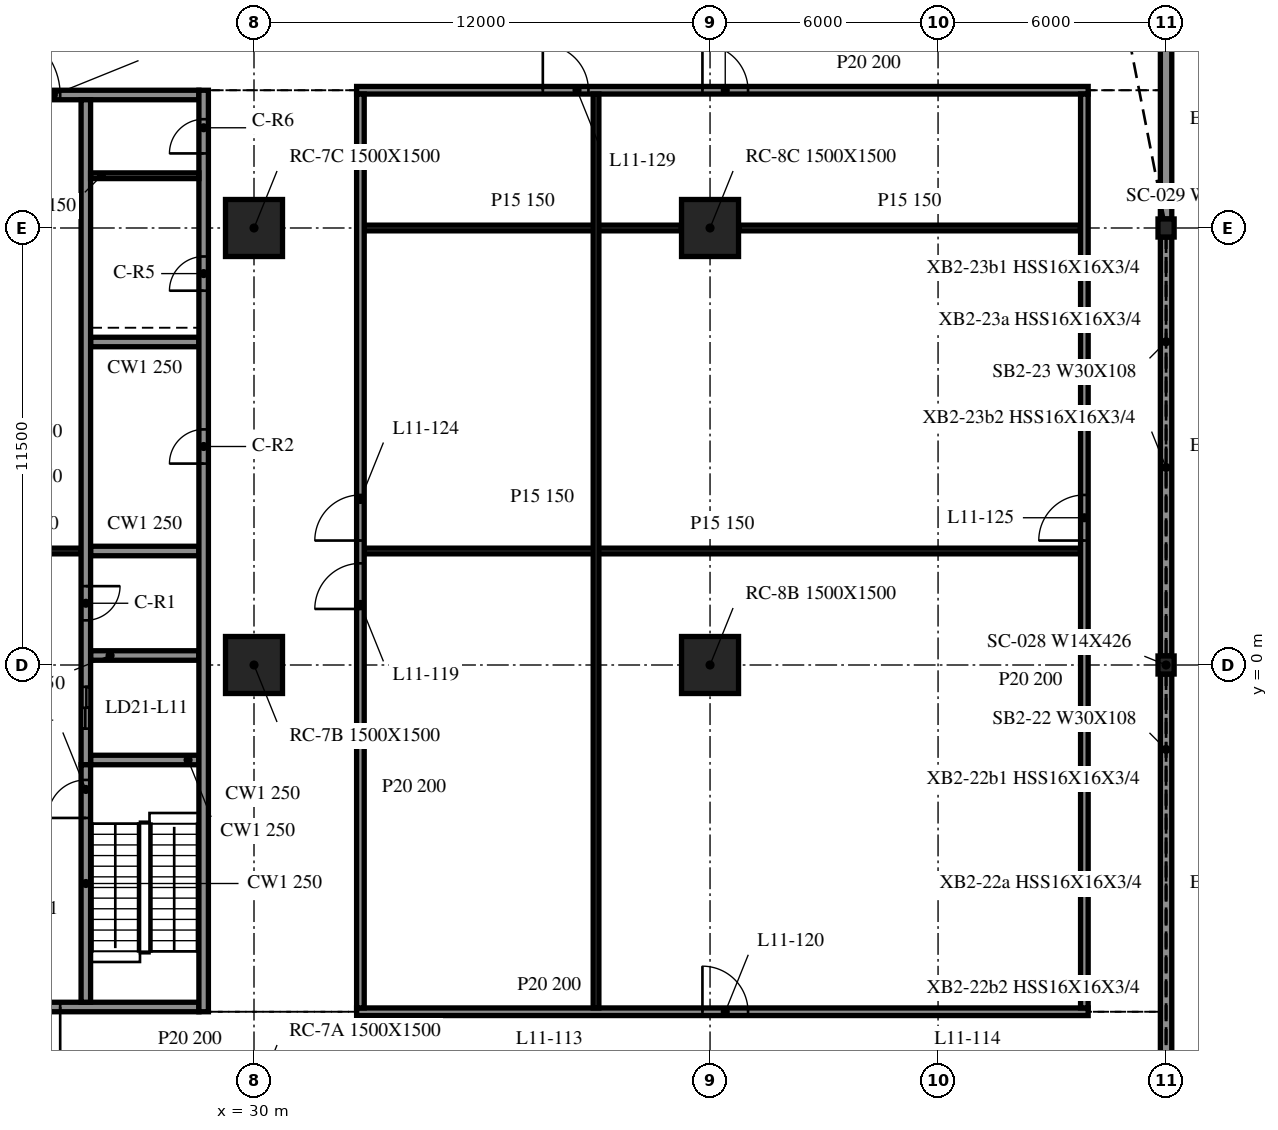
"""IFC4 building model, lengths in metres.
Left out: names, types, materials, properties, quantities, classifications, styles, units other than length and angle.
Written with IfcOpenShell. Run it as: python <this file> out.ifc"""

import sys

from ifc_helpers import new_model, si_unit, direction, frame, frame_2d, origin, origin_2d, place, context, subcontext, project, spatial, rectangle, i_section, extrude, element, fill, save


model = new_model("IFC4")
c1 = context("Model", 3, precision=1e-05, world=origin(), true_north=direction((0.0, 1.0)))
c2 = subcontext(c1, "Body", "Model", "MODEL_VIEW")
j1 = project(units=[si_unit("LENGTHUNIT", "METRE"), si_unit("PLANEANGLEUNIT", "RADIAN")], contexts=[c1])
p1 = place(None, origin())
s1 = spatial("IfcSite", under=j1, at=p1, CompositionType="ELEMENT")
p2 = place(p1, origin())
s2 = spatial("IfcBuilding", under=s1, at=p2, CompositionType="ELEMENT")
p3 = place(p2, frame((0.0, 0.0, 50.3)))
s3 = spatial("IfcBuildingStorey", under=s2, at=p3, CompositionType="ELEMENT", Elevation=50.3)
for number, where, z_axis, x_axis in (
    (1, (30.0, 0.0, -0.34), (0.0, 0.0, 1.0), (1.0, 0.0, 0.0)),
    (2, (30.0, 11.5, -0.34), (0.0, 0.0, 1.0), (1.0, 0.0, 0.0)),
    (3, (42.0, 0.0, -0.34), (0.0, 0.0, 1.0), (1.0, 0.0, 0.0)),
    (4, (42.0, 11.5, -0.34), (0.0, 0.0, 1.0), (1.0, 0.0, 0.0)),
):
    element("IfcColumn", number, at=place(p3, frame(where, z_axis=z_axis, x_axis=x_axis)), inside=s3, PredefinedType="COLUMN", context=c2, shape_type="SweptSolid", body=[
        extrude(rectangle(XDim=1.5, YDim=1.5, at=origin_2d()), origin(), (0.0, 0.0, 1.0), 4.3),
    ])
for number, where, z_axis, x_axis in (
    (5, (54.0, 0.0, -0.34), (0.0, 0.0, 1.0), (1.0, 0.0, 0.0)),
    (6, (54.0, 11.5, -0.34), (0.0, 0.0, 1.0), (1.0, 0.0, 0.0)),
):
    element("IfcColumn", number, at=place(p3, frame(where, z_axis=z_axis, x_axis=x_axis)), inside=s3, PredefinedType="COLUMN", context=c2, shape_type="SweptSolid", body=[
        extrude(i_section(OverallWidth=0.424, OverallDepth=0.475, WebThickness=0.048, FlangeThickness=0.077, at=origin_2d()), origin(), (0.0, 0.0, 1.0), 4.3),
    ])
for number, where, z_axis, x_axis in (
    (7, (54.0, -11.262, 0.0), (0.0, 0.0, 1.0), (0.0, 1.0, 0.0)),
    (8, (54.0, 0.238, 0.0), (0.0, 0.0, 1.0), (0.0, 1.0, 0.0)),
):
    element("IfcWall", number, at=place(p3, frame(where, z_axis=z_axis, x_axis=x_axis)), inside=s3, PredefinedType="NOTDEFINED", context=c2, shape_type="SweptSolid", body=[
        extrude(rectangle(XDim=11.024, YDim=0.3, at=frame_2d((5.512, 0.0))), origin(), (0.0, 0.0, 1.0), 3.203),
    ])
p4 = place(p3, frame((54.0, 11.738, 0.0), z_axis=(0.0, 0.0, 1.0), x_axis=(0.0, 1.0, 0.0)))
e9 = element("IfcWall", 9, at=p4, inside=s3, PredefinedType="NOTDEFINED", context=c2, shape_type="SweptSolid", body=[
    extrude(rectangle(XDim=5.262, YDim=0.3, at=frame_2d((2.631, 0.0))), origin(), (0.0, 0.0, 1.0), 3.203),
])
p5 = place(p3, frame((28.675, -9.125, 0.0), z_axis=(0.0, 0.0, 1.0), x_axis=(0.0, 1.0, 0.0)))
e10 = element("IfcWall", 10, at=p5, inside=s3, PredefinedType="SOLIDWALL", context=c2, shape_type="SweptSolid", body=[
    extrude(rectangle(XDim=24.25, YDim=0.25, at=frame_2d((12.125, 0.0))), origin(), (0.0, 0.0, 1.0), 3.96),
])
p6 = place(p5, frame((14.425, 0.0, 0.0)))
e11 = element("IfcOpeningElement", 11, at=p6, cuts=e10, PredefinedType="OPENING", context=c2, shape_type="SweptSolid", body=[
    extrude(rectangle(XDim=0.9, YDim=2.1, at=frame_2d((0.45, 1.05))), frame((0.0, 0.135, 0.0), z_axis=(0.0, -1.0, 0.0), x_axis=(1.0, 0.0, 0.0)), (0.0, 0.0, 1.0), 0.27),
])
p7 = place(p5, frame((18.975, 0.0, 0.0)))
e12 = element("IfcOpeningElement", 12, at=p7, cuts=e10, PredefinedType="OPENING", context=c2, shape_type="SweptSolid", body=[
    extrude(rectangle(XDim=0.9, YDim=2.1, at=frame_2d((0.45, 1.05))), frame((0.0, 0.135, 0.0), z_axis=(0.0, -1.0, 0.0), x_axis=(1.0, 0.0, 0.0)), (0.0, 0.0, 1.0), 0.27),
])
p8 = place(p5, frame((22.587, 0.0, 0.0)))
e13 = element("IfcOpeningElement", 13, at=p8, cuts=e10, PredefinedType="OPENING", context=c2, shape_type="SweptSolid", body=[
    extrude(rectangle(XDim=0.9, YDim=2.1, at=frame_2d((0.45, 1.05))), frame((0.0, 0.135, 0.0), z_axis=(0.0, -1.0, 0.0), x_axis=(1.0, 0.0, 0.0)), (0.0, 0.0, 1.0), 0.27),
])
p9 = place(p3, frame((28.55, -9.0, 0.0), z_axis=(0.0, 0.0, 1.0), x_axis=(-1.0, 0.0, 0.0)))
e14 = element("IfcWall", 14, at=p9, inside=s3, PredefinedType="SOLIDWALL", context=c2, shape_type="SweptSolid", body=[
    extrude(rectangle(XDim=9.1, YDim=0.25, at=frame_2d((4.55, 0.0))), origin(), (0.0, 0.0, 1.0), 3.96),
])
p10 = place(p9, frame((3.65, 0.0, 0.0)))
e15 = element("IfcOpeningElement", 15, at=p10, cuts=e14, PredefinedType="OPENING", context=c2, shape_type="SweptSolid", body=[
    extrude(rectangle(XDim=1.8, YDim=2.1, at=frame_2d((0.9, 1.05))), frame((0.0, 0.135, 0.0), z_axis=(0.0, -1.0, 0.0), x_axis=(1.0, 0.0, 0.0)), (0.0, 0.0, 1.0), 0.27),
])
p11 = place(p3, frame((19.45, 15.0, 0.0), z_axis=(0.0, 0.0, 1.0), x_axis=(1.0, 0.0, 0.0)))
e16 = element("IfcWall", 16, at=p11, inside=s3, PredefinedType="SOLIDWALL", context=c2, shape_type="SweptSolid", body=[
    extrude(rectangle(XDim=9.1, YDim=0.25, at=frame_2d((4.55, 0.0))), origin(), (0.0, 0.0, 1.0), 3.96),
])
p12 = place(p11, frame((3.65, 0.0, 0.0)))
e17 = element("IfcOpeningElement", 17, at=p12, cuts=e16, PredefinedType="OPENING", context=c2, shape_type="SweptSolid", body=[
    extrude(rectangle(XDim=1.8, YDim=2.1, at=frame_2d((0.9, 1.05))), frame((0.0, 0.135, 0.0), z_axis=(0.0, -1.0, 0.0), x_axis=(1.0, 0.0, 0.0)), (0.0, 0.0, 1.0), 0.27),
])
p13 = place(p3, frame((25.575, -8.875, 0.0), z_axis=(0.0, 0.0, 1.0), x_axis=(0.0, 1.0, 0.0)))
e18 = element("IfcWall", 18, at=p13, inside=s3, PredefinedType="SOLIDWALL", context=c2, shape_type="SweptSolid", body=[
    extrude(rectangle(XDim=6.25, YDim=0.25, at=frame_2d((3.125, 0.0))), origin(), (0.0, 0.0, 1.0), 3.96),
])
p14 = place(p13, frame((4.85, 0.0, 0.0)))
e19 = element("IfcOpeningElement", 19, at=p14, cuts=e18, PredefinedType="OPENING", context=c2, shape_type="SweptSolid", body=[
    extrude(rectangle(XDim=1.0, YDim=2.1, at=frame_2d((0.5, 1.05))), frame((0.0, 0.135, 0.0), z_axis=(0.0, -1.0, 0.0), x_axis=(1.0, 0.0, 0.0)), (0.0, 0.0, 1.0), 0.27),
])
p15 = place(p3, frame((25.575, 14.875, 0.0), z_axis=(0.0, 0.0, 1.0), x_axis=(0.0, -1.0, 0.0)))
e20 = element("IfcWall", 20, at=p15, inside=s3, PredefinedType="SOLIDWALL", context=c2, shape_type="SweptSolid", body=[
    extrude(rectangle(XDim=17.5, YDim=0.25, at=frame_2d((8.75, 0.0))), origin(), (0.0, 0.0, 1.0), 3.96),
])
p16 = place(p15, frame((15.45, 0.0, 0.0)))
e21 = element("IfcOpeningElement", 21, at=p16, cuts=e20, PredefinedType="OPENING", context=c2, shape_type="SweptSolid", body=[
    extrude(rectangle(XDim=1.1, YDim=2.1, at=frame_2d((0.55, 1.05))), frame((0.0, 0.135, 0.0), z_axis=(0.0, -1.0, 0.0), x_axis=(1.0, 0.0, 0.0)), (0.0, 0.0, 1.0), 0.27),
])
p17 = place(p15, frame((12.8, 0.0, 0.0)))
e22 = element("IfcOpeningElement", 22, at=p17, cuts=e20, PredefinedType="OPENING", context=c2, shape_type="SweptSolid", body=[
    extrude(rectangle(XDim=0.9, YDim=2.1, at=frame_2d((0.45, 1.05))), frame((0.0, 0.135, 0.0), z_axis=(0.0, -1.0, 0.0), x_axis=(1.0, 0.0, 0.0)), (0.0, 0.0, 1.0), 0.27),
])
for number, where, z_axis, x_axis in (
    (23, (25.7, -2.5, 0.0), (0.0, 0.0, 1.0), (1.0, 0.0, 0.0)),
    (24, (25.7, 0.25, 0.0), (0.0, 0.0, 1.0), (1.0, 0.0, 0.0)),
    (25, (25.7, 3.0, 0.0), (0.0, 0.0, 1.0), (1.0, 0.0, 0.0)),
    (26, (25.7, 8.5, 0.0), (0.0, 0.0, 1.0), (1.0, 0.0, 0.0)),
):
    element("IfcWall", number, at=place(p3, frame(where, z_axis=z_axis, x_axis=x_axis)), inside=s3, PredefinedType="SOLIDWALL", context=c2, shape_type="SweptSolid", body=[
        extrude(rectangle(XDim=2.85, YDim=0.25, at=frame_2d((1.425, 0.0))), origin(), (0.0, 0.0, 1.0), 3.96),
    ])
p18 = place(p3, frame((22.55, 3.0, 0.0), z_axis=(0.0, 0.0, 1.0), x_axis=(1.0, 0.0, 0.0)))
e27 = element("IfcWall", 27, at=p18, inside=s3, PredefinedType="PARTITIONING", context=c2, shape_type="SweptSolid", body=[
    extrude(rectangle(XDim=2.9, YDim=0.15, at=frame_2d((1.45, 0.0))), origin(), (0.0, 0.0, 1.0), 3.96),
])
p19 = place(p3, frame((25.7, 12.875, 0.0), z_axis=(0.0, 0.0, 1.0), x_axis=(1.0, 0.0, 0.0)))
e28 = element("IfcWall", 28, at=p19, inside=s3, PredefinedType="PARTITIONING", context=c2, shape_type="SweptSolid", body=[
    extrude(rectangle(XDim=2.85, YDim=0.15, at=frame_2d((1.425, 0.0))), origin(), (0.0, 0.0, 1.0), 3.96),
])
p20 = place(p3, frame((32.7, -9.125, 0.0), z_axis=(0.0, 0.0, 1.0), x_axis=(1.0, 0.0, 0.0)))
e29 = element("IfcWall", 29, at=p20, inside=s3, PredefinedType="PARTITIONING", context=c2, shape_type="SweptSolid", body=[
    extrude(rectangle(XDim=19.25, YDim=0.2, at=frame_2d((9.625, 0.0))), origin(), (0.0, 0.0, 1.0), 3.96),
])
p21 = place(p20, frame((9.1, 0.0, 0.0)))
e30 = element("IfcOpeningElement", 30, at=p21, cuts=e29, PredefinedType="OPENING", context=c2, shape_type="SweptSolid", body=[
    extrude(rectangle(XDim=1.2, YDim=2.1, at=frame_2d((0.6, 1.05))), frame((0.0, 0.11, 0.0), z_axis=(0.0, -1.0, 0.0), x_axis=(1.0, 0.0, 0.0)), (0.0, 0.0, 1.0), 0.22),
])
p22 = place(p3, frame((32.9, 3.0, 0.0), z_axis=(0.0, 0.0, 1.0), x_axis=(1.0, 0.0, 0.0)))
e31 = element("IfcWall", 31, at=p22, inside=s3, PredefinedType="PARTITIONING", context=c2, shape_type="SweptSolid", body=[
    extrude(rectangle(XDim=18.85, YDim=0.15, at=frame_2d((9.425, 0.0))), origin(), (0.0, 0.0, 1.0), 3.96),
])
p23 = place(p3, frame((32.9, 11.5, 0.0), z_axis=(0.0, 0.0, 1.0), x_axis=(1.0, 0.0, 0.0)))
e32 = element("IfcWall", 32, at=p23, inside=s3, PredefinedType="PARTITIONING", context=c2, shape_type="SweptSolid", body=[
    extrude(rectangle(XDim=8.35, YDim=0.15, at=frame_2d((4.175, 0.0))), origin(), (0.0, 0.0, 1.0), 3.96),
])
p24 = place(p3, frame((42.75, 11.5, 0.0), z_axis=(0.0, 0.0, 1.0), x_axis=(1.0, 0.0, 0.0)))
e33 = element("IfcWall", 33, at=p24, inside=s3, PredefinedType="PARTITIONING", context=c2, shape_type="SweptSolid", body=[
    extrude(rectangle(XDim=9.0, YDim=0.15, at=frame_2d((4.5, 0.0))), origin(), (0.0, 0.0, 1.0), 3.96),
])
p25 = place(p3, frame((32.7, 15.125, 0.0), z_axis=(0.0, 0.0, 1.0), x_axis=(1.0, 0.0, 0.0)))
e34 = element("IfcWall", 34, at=p25, inside=s3, PredefinedType="PARTITIONING", context=c2, shape_type="SweptSolid", body=[
    extrude(rectangle(XDim=19.25, YDim=0.2, at=frame_2d((9.625, 0.0))), origin(), (0.0, 0.0, 1.0), 3.96),
])
p26 = place(p25, frame((4.9, 0.0, 0.0)))
e35 = element("IfcOpeningElement", 35, at=p26, cuts=e34, PredefinedType="OPENING", context=c2, shape_type="SweptSolid", body=[
    extrude(rectangle(XDim=1.2, YDim=2.1, at=frame_2d((0.6, 1.05))), frame((0.0, 0.11, 0.0), z_axis=(0.0, -1.0, 0.0), x_axis=(1.0, 0.0, 0.0)), (0.0, 0.0, 1.0), 0.22),
])
p27 = place(p25, frame((9.1, 0.0, 0.0)))
e36 = element("IfcOpeningElement", 36, at=p27, cuts=e34, PredefinedType="OPENING", context=c2, shape_type="SweptSolid", body=[
    extrude(rectangle(XDim=1.2, YDim=2.1, at=frame_2d((0.6, 1.05))), frame((0.0, 0.11, 0.0), z_axis=(0.0, -1.0, 0.0), x_axis=(1.0, 0.0, 0.0)), (0.0, 0.0, 1.0), 0.22),
])
p28 = place(p3, frame((32.8, -9.025, 0.0), z_axis=(0.0, 0.0, 1.0), x_axis=(0.0, 1.0, 0.0)))
e37 = element("IfcWall", 37, at=p28, inside=s3, PredefinedType="PARTITIONING", context=c2, shape_type="SweptSolid", body=[
    extrude(rectangle(XDim=24.05, YDim=0.2, at=frame_2d((12.025, 0.0))), origin(), (0.0, 0.0, 1.0), 3.96),
])
p29 = place(p28, frame((10.5, 0.0, 0.0)))
e38 = element("IfcOpeningElement", 38, at=p29, cuts=e37, PredefinedType="OPENING", context=c2, shape_type="SweptSolid", body=[
    extrude(rectangle(XDim=1.2, YDim=2.1, at=frame_2d((0.6, 1.05))), frame((0.0, 0.11, 0.0), z_axis=(0.0, -1.0, 0.0), x_axis=(1.0, 0.0, 0.0)), (0.0, 0.0, 1.0), 0.22),
])
p30 = place(p28, frame((12.3, 0.0, 0.0)))
e39 = element("IfcOpeningElement", 39, at=p30, cuts=e37, PredefinedType="OPENING", context=c2, shape_type="SweptSolid", body=[
    extrude(rectangle(XDim=1.2, YDim=2.1, at=frame_2d((0.6, 1.05))), frame((0.0, 0.11, 0.0), z_axis=(0.0, -1.0, 0.0), x_axis=(1.0, 0.0, 0.0)), (0.0, 0.0, 1.0), 0.22),
])
p31 = place(p3, frame((39.0, -9.025, 0.0), z_axis=(0.0, 0.0, 1.0), x_axis=(0.0, 1.0, 0.0)))
e40 = element("IfcWall", 40, at=p31, inside=s3, PredefinedType="PARTITIONING", context=c2, shape_type="SweptSolid", body=[
    extrude(rectangle(XDim=24.05, YDim=0.15, at=frame_2d((12.025, 0.0))), origin(), (0.0, 0.0, 1.0), 3.96),
])
p32 = place(p3, frame((51.85, -9.025, 0.0), z_axis=(0.0, 0.0, 1.0), x_axis=(0.0, 1.0, 0.0)))
e41 = element("IfcWall", 41, at=p32, inside=s3, PredefinedType="PARTITIONING", context=c2, shape_type="SweptSolid", body=[
    extrude(rectangle(XDim=24.05, YDim=0.2, at=frame_2d((12.025, 0.0))), origin(), (0.0, 0.0, 1.0), 3.96),
])
p33 = place(p32, frame((12.3, 0.0, 0.0)))
e42 = element("IfcOpeningElement", 42, at=p33, cuts=e41, PredefinedType="OPENING", context=c2, shape_type="SweptSolid", body=[
    extrude(rectangle(XDim=1.2, YDim=2.1, at=frame_2d((0.6, 1.05))), frame((0.0, 0.11, 0.0), z_axis=(0.0, -1.0, 0.0), x_axis=(1.0, 0.0, 0.0)), (0.0, 0.0, 1.0), 0.22),
])
p34 = place(p10, origin())
e43 = element("IfcDoor", 43, at=p34, inside=s3, OperationType="DOUBLE_DOOR_SINGLE_SWING", PredefinedType="DOOR", context=c2, shape_type="SweptSolid", body=[
    extrude(rectangle(XDim=1.8, YDim=2.1, at=frame_2d((0.9, 1.05))), frame((0.0, 0.025, 0.0), z_axis=(0.0, -1.0, 0.0), x_axis=(1.0, 0.0, 0.0)), (0.0, 0.0, 1.0), 0.05),
])
fill(e15, e43)
p35 = place(p12, origin())
e44 = element("IfcDoor", 44, at=p35, inside=s3, OperationType="DOUBLE_DOOR_SINGLE_SWING", PredefinedType="DOOR", context=c2, shape_type="SweptSolid", body=[
    extrude(rectangle(XDim=1.8, YDim=2.1, at=frame_2d((0.9, 1.05))), frame((0.0, 0.025, 0.0), z_axis=(0.0, -1.0, 0.0), x_axis=(1.0, 0.0, 0.0)), (0.0, 0.0, 1.0), 0.05),
])
fill(e17, e44)
p36 = place(p16, origin())
e45 = element("IfcDoor", 45, at=p36, inside=s3, OperationType="DOUBLE_DOOR_SLIDING", PredefinedType="DOOR", context=c2, shape_type="SweptSolid", body=[
    extrude(rectangle(XDim=1.1, YDim=2.1, at=frame_2d((0.55, 1.05))), frame((0.0, 0.025, 0.0), z_axis=(0.0, -1.0, 0.0), x_axis=(1.0, 0.0, 0.0)), (0.0, 0.0, 1.0), 0.05),
])
fill(e21, e45)
p37 = place(p17, origin())
e46 = element("IfcDoor", 46, at=p37, inside=s3, OperationType="SINGLE_SWING_LEFT", PredefinedType="DOOR", context=c2, shape_type="SweptSolid", body=[
    extrude(rectangle(XDim=0.9, YDim=2.1, at=frame_2d((0.45, 1.05))), frame((0.0, 0.025, 0.0), z_axis=(0.0, -1.0, 0.0), x_axis=(1.0, 0.0, 0.0)), (0.0, 0.0, 1.0), 0.05),
])
fill(e22, e46)
p38 = place(p6, origin())
e47 = element("IfcDoor", 47, at=p38, inside=s3, OperationType="SINGLE_SWING_RIGHT", PredefinedType="DOOR", context=c2, shape_type="SweptSolid", body=[
    extrude(rectangle(XDim=0.9, YDim=2.1, at=frame_2d((0.45, 1.05))), frame((0.0, 0.025, 0.0), z_axis=(0.0, -1.0, 0.0), x_axis=(1.0, 0.0, 0.0)), (0.0, 0.0, 1.0), 0.05),
])
fill(e11, e47)
p39 = place(p7, origin())
e48 = element("IfcDoor", 48, at=p39, inside=s3, OperationType="SINGLE_SWING_LEFT", PredefinedType="DOOR", context=c2, shape_type="SweptSolid", body=[
    extrude(rectangle(XDim=0.9, YDim=2.1, at=frame_2d((0.45, 1.05))), frame((0.0, 0.025, 0.0), z_axis=(0.0, -1.0, 0.0), x_axis=(1.0, 0.0, 0.0)), (0.0, 0.0, 1.0), 0.05),
])
fill(e12, e48)
p40 = place(p8, origin())
e49 = element("IfcDoor", 49, at=p40, inside=s3, OperationType="SINGLE_SWING_RIGHT", PredefinedType="DOOR", context=c2, shape_type="SweptSolid", body=[
    extrude(rectangle(XDim=0.9, YDim=2.1, at=frame_2d((0.45, 1.05))), frame((0.0, 0.025, 0.0), z_axis=(0.0, -1.0, 0.0), x_axis=(1.0, 0.0, 0.0)), (0.0, 0.0, 1.0), 0.05),
])
fill(e13, e49)
p41 = place(p14, origin())
e50 = element("IfcDoor", 50, at=p41, inside=s3, OperationType="SINGLE_SWING_RIGHT", PredefinedType="DOOR", context=c2, shape_type="SweptSolid", body=[
    extrude(rectangle(XDim=1.0, YDim=2.1, at=frame_2d((0.5, 1.05))), frame((0.0, 0.025, 0.0), z_axis=(0.0, -1.0, 0.0), x_axis=(1.0, 0.0, 0.0)), (0.0, 0.0, 1.0), 0.05),
])
fill(e19, e50)
p42 = place(p29, origin())
e51 = element("IfcDoor", 51, at=p42, inside=s3, OperationType="SINGLE_SWING_RIGHT", PredefinedType="DOOR", context=c2, shape_type="SweptSolid", body=[
    extrude(rectangle(XDim=1.2, YDim=2.1, at=frame_2d((0.6, 1.05))), frame((0.0, 0.025, 0.0), z_axis=(0.0, -1.0, 0.0), x_axis=(1.0, 0.0, 0.0)), (0.0, 0.0, 1.0), 0.05),
])
fill(e38, e51)
p43 = place(p21, origin())
e52 = element("IfcDoor", 52, at=p43, inside=s3, OperationType="SINGLE_SWING_RIGHT", PredefinedType="DOOR", context=c2, shape_type="SweptSolid", body=[
    extrude(rectangle(XDim=1.2, YDim=2.1, at=frame_2d((0.6, 1.05))), frame((0.0, 0.025, 0.0), z_axis=(0.0, -1.0, 0.0), x_axis=(1.0, 0.0, 0.0)), (0.0, 0.0, 1.0), 0.05),
])
fill(e30, e52)
p44 = place(p30, origin())
e53 = element("IfcDoor", 53, at=p44, inside=s3, OperationType="SINGLE_SWING_LEFT", PredefinedType="DOOR", context=c2, shape_type="SweptSolid", body=[
    extrude(rectangle(XDim=1.2, YDim=2.1, at=frame_2d((0.6, 1.05))), frame((0.0, 0.025, 0.0), z_axis=(0.0, -1.0, 0.0), x_axis=(1.0, 0.0, 0.0)), (0.0, 0.0, 1.0), 0.05),
])
fill(e39, e53)
p45 = place(p33, origin())
e54 = element("IfcDoor", 54, at=p45, inside=s3, OperationType="SINGLE_SWING_RIGHT", PredefinedType="DOOR", context=c2, shape_type="SweptSolid", body=[
    extrude(rectangle(XDim=1.2, YDim=2.1, at=frame_2d((0.6, 1.05))), frame((0.0, 0.025, 0.0), z_axis=(0.0, -1.0, 0.0), x_axis=(1.0, 0.0, 0.0)), (0.0, 0.0, 1.0), 0.05),
])
fill(e42, e54)
p46 = place(p26, origin())
e55 = element("IfcDoor", 55, at=p46, inside=s3, OperationType="SINGLE_SWING_RIGHT", PredefinedType="DOOR", context=c2, shape_type="SweptSolid", body=[
    extrude(rectangle(XDim=1.2, YDim=2.1, at=frame_2d((0.6, 1.05))), frame((0.0, 0.025, 0.0), z_axis=(0.0, -1.0, 0.0), x_axis=(1.0, 0.0, 0.0)), (0.0, 0.0, 1.0), 0.05),
])
fill(e35, e55)
p47 = place(p27, origin())
e56 = element("IfcDoor", 56, at=p47, inside=s3, OperationType="SINGLE_SWING_LEFT", PredefinedType="DOOR", context=c2, shape_type="SweptSolid", body=[
    extrude(rectangle(XDim=1.2, YDim=2.1, at=frame_2d((0.6, 1.05))), frame((0.0, 0.025, 0.0), z_axis=(0.0, -1.0, 0.0), x_axis=(1.0, 0.0, 0.0)), (0.0, 0.0, 1.0), 0.05),
])
fill(e36, e56)
save(model, sys.argv[1])
